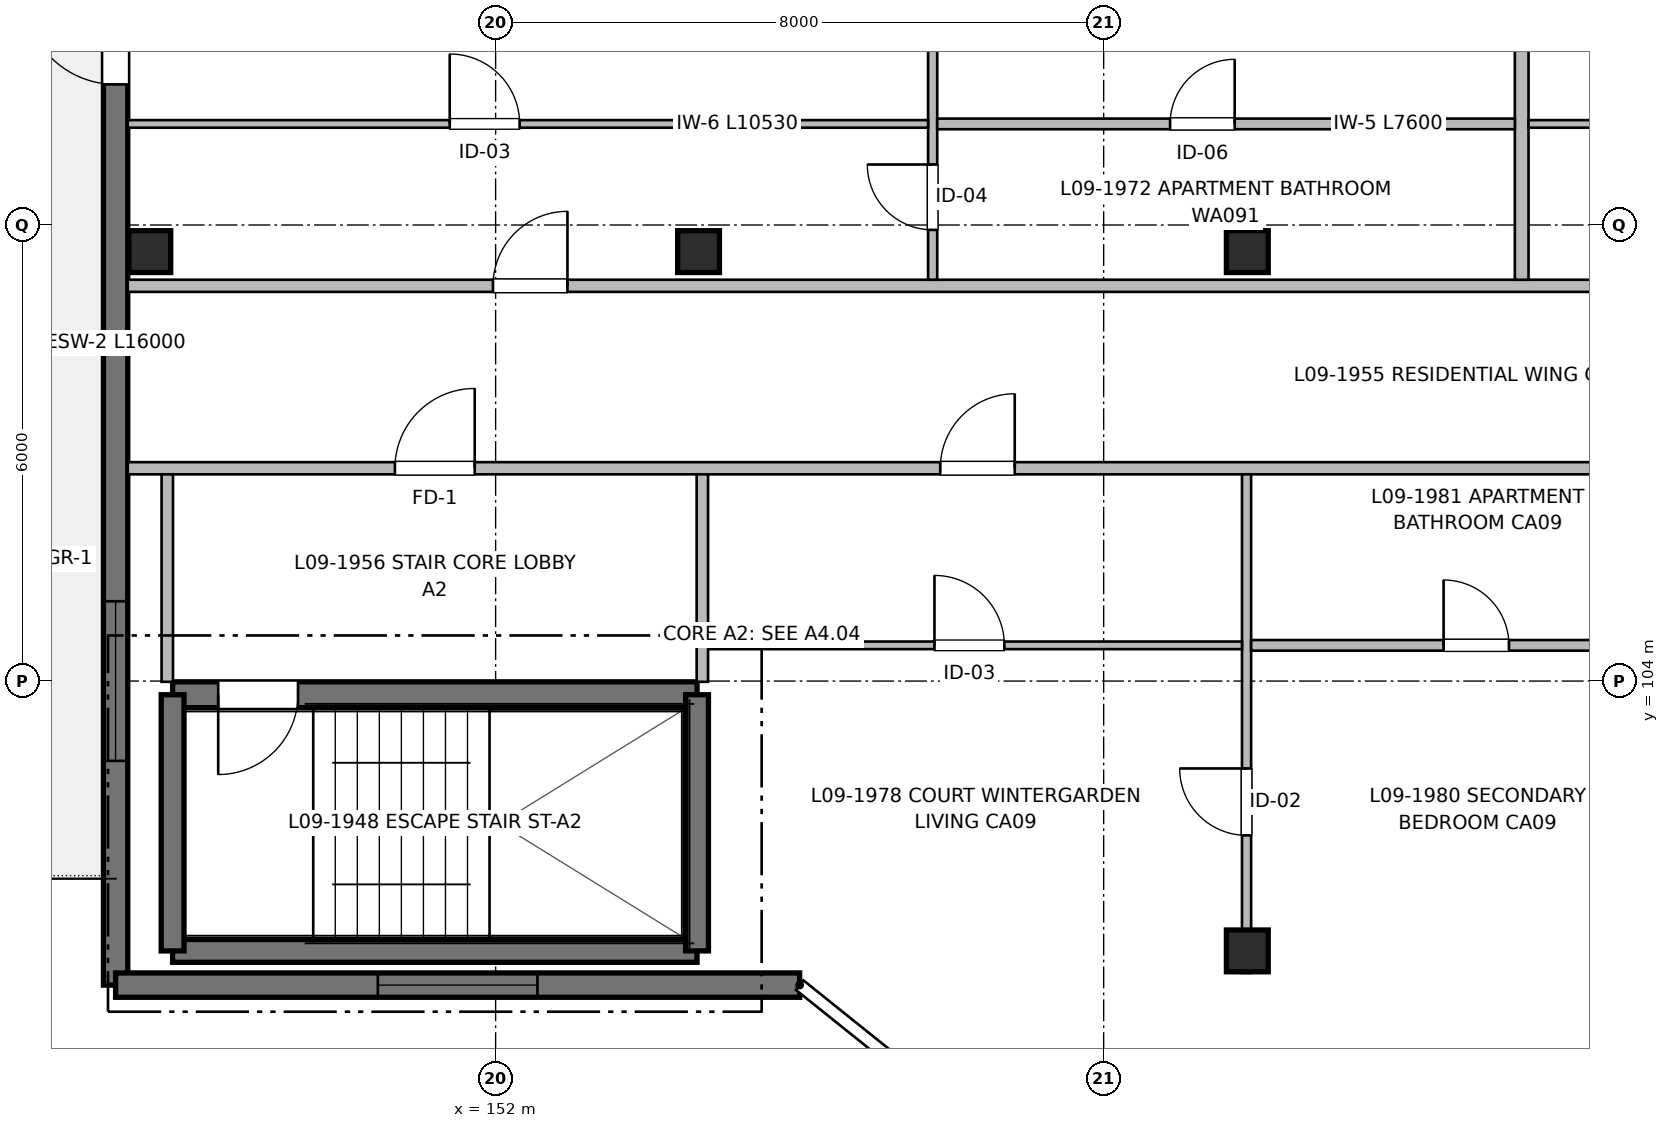
"""IFC4 building model, lengths in metres.
Left out: names, types, materials, properties, quantities, classifications, styles, units other than length and angle.
Written with IfcOpenShell. Run it as: python <this file> out.ifc"""

import sys

from ifc_helpers import new_model, si_unit, direction, frame, frame_2d, origin, origin_2d, place, context, subcontext, project, spatial, rectangle, extrude, element, fill, save


model = new_model("IFC4")
c1 = context("Model", 3, precision=1e-05, world=origin(), true_north=direction((0.0, 1.0)))
c2 = subcontext(c1, "Body", "Model", "MODEL_VIEW")
j1 = project(units=[si_unit("LENGTHUNIT", "METRE"), si_unit("PLANEANGLEUNIT", "RADIAN")], contexts=[c1])
p1 = place(None, origin())
s1 = spatial("IfcSite", under=j1, at=p1, CompositionType="ELEMENT")
p2 = place(p1, origin())
s2 = spatial("IfcBuilding", under=s1, at=p2, CompositionType="ELEMENT")
p3 = place(p2, frame((0.0, 0.0, 29.76)))
s3 = spatial("IfcBuildingStorey", under=s2, at=p3, CompositionType="ELEMENT", Elevation=29.76)
for number, where, z_axis, x_axis in (
    (1, (147.45, 109.65, 0.0), (0.0, 0.0, 1.0), (1.0, 0.0, 0.0)),
    (2, (154.67, 109.65, 0.0), (0.0, 0.0, 1.0), (1.0, 0.0, 0.0)),
    (3, (161.89, 100.45, 0.0), (0.0, 0.0, 1.0), (1.0, 0.0, 0.0)),
    (4, (161.89, 109.65, 0.0), (0.0, 0.0, 1.0), (1.0, 0.0, 0.0)),
):
    element("IfcColumn", number, at=place(p3, frame(where, z_axis=z_axis, x_axis=x_axis)), inside=s3, PredefinedType="COLUMN", context=c2, shape_type="SweptSolid", body=[
        extrude(rectangle(XDim=0.55, YDim=0.55, at=origin_2d()), origin(), (0.0, 0.0, 1.0), 3.2),
    ])
p4 = place(p3, frame((147.75, 100.45, 0.0), z_axis=(0.0, 0.0, 1.0), x_axis=(1.0, 0.0, 0.0)))
e5 = element("IfcWall", 5, at=p4, inside=s3, PredefinedType="SHEAR", context=c2, shape_type="SweptSolid", body=[
    extrude(rectangle(XDim=6.9, YDim=0.3, at=frame_2d((3.45, 0.0))), origin(), (0.0, 0.0, 1.0), 3.2),
])
p5 = place(p3, frame((154.65, 103.82, 0.0), z_axis=(0.0, 0.0, 1.0), x_axis=(-1.0, 0.0, 0.0)))
e6 = element("IfcWall", 6, at=p5, inside=s3, PredefinedType="SHEAR", context=c2, shape_type="SweptSolid", body=[
    extrude(rectangle(XDim=6.9, YDim=0.34, at=frame_2d((3.45, 0.0))), origin(), (0.0, 0.0, 1.0), 3.2),
])
p6 = place(p5, frame((5.25, 0.0, 0.0)))
e7 = element("IfcOpeningElement", 7, at=p6, cuts=e6, PredefinedType="OPENING", context=c2, shape_type="SweptSolid", body=[
    extrude(rectangle(XDim=1.05, YDim=2.15, at=frame_2d((0.525, 1.075))), frame((0.0, 0.18, 0.0), z_axis=(0.0, -1.0, 0.0), x_axis=(1.0, 0.0, 0.0)), (0.0, 0.0, 1.0), 0.36),
])
for number, where, z_axis, x_axis in (
    (8, (147.75, 103.82, 0.0), (0.0, 0.0, 1.0), (0.0, -1.0, 0.0)),
    (9, (154.65, 100.45, 0.0), (0.0, 0.0, 1.0), (0.0, 1.0, 0.0)),
):
    element("IfcWall", number, at=place(p3, frame(where, z_axis=z_axis, x_axis=x_axis)), inside=s3, PredefinedType="SHEAR", context=c2, shape_type="SweptSolid", body=[
        extrude(rectangle(XDim=3.37, YDim=0.3, at=frame_2d((1.685, 0.0))), origin(), (0.0, 0.0, 1.0), 3.2),
    ])
p7 = place(p3, frame((147.0, 100.0, 0.0), z_axis=(0.0, 0.0, 1.0), x_axis=(0.0, 1.0, 0.0)))
e10 = element("IfcWall", 10, at=p7, inside=s3, PredefinedType="SHEAR", context=c2, shape_type="SweptSolid", body=[
    extrude(rectangle(XDim=16.0, YDim=0.32, at=frame_2d((8.0, 0.0))), origin(), (0.0, 0.0, 1.0), 2.98),
])
p8 = place(p7, frame((2.95, 0.0, 0.67)))
e11 = element("IfcOpeningElement", 11, at=p8, cuts=e10, PredefinedType="OPENING", context=c2, shape_type="SweptSolid", body=[
    extrude(rectangle(XDim=2.1, YDim=1.55, at=frame_2d((1.05, 0.775))), frame((0.0, 0.17, 0.0), z_axis=(0.0, -1.0, 0.0), x_axis=(1.0, 0.0, 0.0)), (0.0, 0.0, 1.0), 0.34),
])
p9 = place(p7, frame((11.85, 0.0, 0.0)))
e12 = element("IfcOpeningElement", 12, at=p9, cuts=e10, PredefinedType="OPENING", context=c2, shape_type="SweptSolid", body=[
    extrude(rectangle(XDim=1.2, YDim=2.2, at=frame_2d((0.6, 1.1))), frame((0.0, 0.17, 0.0), z_axis=(0.0, -1.0, 0.0), x_axis=(1.0, 0.0, 0.0)), (0.0, 0.0, 1.0), 0.34),
])
p10 = place(p3, frame((156.0, 100.0, 0.0), z_axis=(0.0, 0.0, 1.0), x_axis=(-1.0, 0.0, 0.0)))
e13 = element("IfcWall", 13, at=p10, inside=s3, PredefinedType="SHEAR", context=c2, shape_type="SweptSolid", body=[
    extrude(rectangle(XDim=9.0, YDim=0.32, at=frame_2d((4.5, 0.0))), origin(), (0.0, 0.0, 1.0), 2.98),
])
p11 = place(p10, frame((3.45, 0.0, 0.67)))
e14 = element("IfcOpeningElement", 14, at=p11, cuts=e13, PredefinedType="OPENING", context=c2, shape_type="SweptSolid", body=[
    extrude(rectangle(XDim=2.1, YDim=1.55, at=frame_2d((1.05, 0.775))), frame((0.0, 0.17, 0.0), z_axis=(0.0, -1.0, 0.0), x_axis=(1.0, 0.0, 0.0)), (0.0, 0.0, 1.0), 0.34),
])
p12 = place(p3, frame((147.16, 106.8, 0.0), z_axis=(0.0, 0.0, 1.0), x_axis=(1.0, 0.0, 0.0)))
e15 = element("IfcWall", 15, at=p12, inside=s3, PredefinedType="PARTITIONING", context=c2, shape_type="SweptSolid", body=[
    extrude(rectangle(XDim=27.64, YDim=0.16, at=frame_2d((13.82, 0.0))), origin(), (0.0, 0.0, 1.0), 2.935),
])
p13 = place(p12, frame((3.515, 0.0, 0.0)))
e16 = element("IfcOpeningElement", 16, at=p13, cuts=e15, PredefinedType="OPENING", context=c2, shape_type="SweptSolid", body=[
    extrude(rectangle(XDim=1.05, YDim=2.15, at=frame_2d((0.525, 1.075))), frame((0.0, 0.09, 0.0), z_axis=(0.0, -1.0, 0.0), x_axis=(1.0, 0.0, 0.0)), (0.0, 0.0, 1.0), 0.18),
])
p14 = place(p12, frame((10.69, 0.0, 0.0)))
e17 = element("IfcOpeningElement", 17, at=p14, cuts=e15, PredefinedType="OPENING", context=c2, shape_type="SweptSolid", body=[
    extrude(rectangle(XDim=0.98, YDim=2.15, at=frame_2d((0.49, 1.075))), frame((0.0, 0.09, 0.0), z_axis=(0.0, -1.0, 0.0), x_axis=(1.0, 0.0, 0.0)), (0.0, 0.0, 1.0), 0.18),
])
p15 = place(p3, frame((147.16, 109.2, 0.0), z_axis=(0.0, 0.0, 1.0), x_axis=(1.0, 0.0, 0.0)))
e18 = element("IfcWall", 18, at=p15, inside=s3, PredefinedType="PARTITIONING", context=c2, shape_type="SweptSolid", body=[
    extrude(rectangle(XDim=36.68, YDim=0.16, at=frame_2d((18.34, 0.0))), origin(), (0.0, 0.0, 1.0), 2.935),
])
p16 = place(p15, frame((4.805, 0.0, 0.0)))
e19 = element("IfcOpeningElement", 19, at=p16, cuts=e18, PredefinedType="OPENING", context=c2, shape_type="SweptSolid", body=[
    extrude(rectangle(XDim=0.98, YDim=2.15, at=frame_2d((0.49, 1.075))), frame((0.0, 0.09, 0.0), z_axis=(0.0, -1.0, 0.0), x_axis=(1.0, 0.0, 0.0)), (0.0, 0.0, 1.0), 0.18),
])
p17 = place(p15, frame((23.235, 0.0, 0.0)))
e20 = element("IfcOpeningElement", 20, at=p17, cuts=e18, PredefinedType="OPENING", context=c2, shape_type="SweptSolid", body=[
    extrude(rectangle(XDim=0.98, YDim=2.15, at=frame_2d((0.49, 1.075))), frame((0.0, 0.09, 0.0), z_axis=(0.0, -1.0, 0.0), x_axis=(1.0, 0.0, 0.0)), (0.0, 0.0, 1.0), 0.18),
])
for number, where, z_axis, x_axis in (
    (21, (147.68, 103.99, 0.0), (0.0, 0.0, 1.0), (0.0, 1.0, 0.0)),
    (22, (154.72, 103.99, 0.0), (0.0, 0.0, 1.0), (0.0, 1.0, 0.0)),
):
    element("IfcWall", number, at=place(p3, frame(where, z_axis=z_axis, x_axis=x_axis)), inside=s3, PredefinedType="PARTITIONING", context=c2, shape_type="SweptSolid", body=[
        extrude(rectangle(XDim=2.73, YDim=0.15, at=frame_2d((1.365, 0.0))), origin(), (0.0, 0.0, 1.0), 2.935),
    ])
p18 = place(p3, frame((165.5, 109.28, 0.0), z_axis=(0.0, 0.0, 1.0), x_axis=(0.0, 1.0, 0.0)))
e23 = element("IfcWall", 23, at=p18, inside=s3, PredefinedType="PARTITIONING", context=c2, shape_type="SweptSolid", body=[
    extrude(rectangle(XDim=6.59, YDim=0.18, at=frame_2d((3.295, 0.0))), origin(), (0.0, 0.0, 1.0), 2.935),
])
p19 = place(p3, frame((157.75, 109.28, 0.0), z_axis=(0.0, 0.0, 1.0), x_axis=(0.0, 1.0, 0.0)))
e24 = element("IfcWall", 24, at=p19, inside=s3, PredefinedType="PARTITIONING", context=c2, shape_type="SweptSolid", body=[
    extrude(rectangle(XDim=6.59, YDim=0.12, at=frame_2d((3.295, 0.0))), origin(), (0.0, 0.0, 1.0), 2.935),
])
p20 = place(p19, frame((0.656, 0.0, 0.0)))
e25 = element("IfcOpeningElement", 25, at=p20, cuts=e24, PredefinedType="OPENING", context=c2, shape_type="SweptSolid", body=[
    extrude(rectangle(XDim=0.86, YDim=2.1, at=frame_2d((0.43, 1.05))), frame((0.0, 0.07, 0.0), z_axis=(0.0, -1.0, 0.0), x_axis=(1.0, 0.0, 0.0)), (0.0, 0.0, 1.0), 0.14),
])
p21 = place(p19, frame((4.093, 0.0, 0.0)))
e26 = element("IfcOpeningElement", 26, at=p21, cuts=e24, PredefinedType="OPENING", context=c2, shape_type="SweptSolid", body=[
    extrude(rectangle(XDim=0.9, YDim=2.1, at=frame_2d((0.45, 1.05))), frame((0.0, 0.07, 0.0), z_axis=(0.0, -1.0, 0.0), x_axis=(1.0, 0.0, 0.0)), (0.0, 0.0, 1.0), 0.14),
])
p22 = place(p3, frame((157.81, 111.33, 0.0), z_axis=(0.0, 0.0, 1.0), x_axis=(1.0, 0.0, 0.0)))
e27 = element("IfcWall", 27, at=p22, inside=s3, PredefinedType="PARTITIONING", context=c2, shape_type="SweptSolid", body=[
    extrude(rectangle(XDim=7.6, YDim=0.14, at=frame_2d((3.8, 0.0))), origin(), (0.0, 0.0, 1.0), 2.935),
])
p23 = place(p22, frame((3.064, 0.0, 0.0)))
e28 = element("IfcOpeningElement", 28, at=p23, cuts=e27, PredefinedType="OPENING", context=c2, shape_type="SweptSolid", body=[
    extrude(rectangle(XDim=0.85, YDim=2.05, at=frame_2d((0.425, 1.025))), frame((0.0, 0.08, 0.0), z_axis=(0.0, -1.0, 0.0), x_axis=(1.0, 0.0, 0.0)), (0.0, 0.0, 1.0), 0.16),
])
p24 = place(p3, frame((147.16, 111.33, 0.0), z_axis=(0.0, 0.0, 1.0), x_axis=(1.0, 0.0, 0.0)))
e29 = element("IfcWall", 29, at=p24, inside=s3, PredefinedType="PARTITIONING", context=c2, shape_type="SweptSolid", body=[
    extrude(rectangle(XDim=10.53, YDim=0.1, at=frame_2d((5.265, 0.0))), origin(), (0.0, 0.0, 1.0), 2.935),
])
p25 = place(p24, frame((4.236, 0.0, 0.0)))
e30 = element("IfcOpeningElement", 30, at=p25, cuts=e29, PredefinedType="OPENING", context=c2, shape_type="SweptSolid", body=[
    extrude(rectangle(XDim=0.92, YDim=2.1, at=frame_2d((0.46, 1.05))), frame((0.0, 0.06, 0.0), z_axis=(0.0, -1.0, 0.0), x_axis=(1.0, 0.0, 0.0)), (0.0, 0.0, 1.0), 0.12),
])
p26 = place(p3, frame((165.59, 111.33, 0.0), z_axis=(0.0, 0.0, 1.0), x_axis=(1.0, 0.0, 0.0)))
e31 = element("IfcWall", 31, at=p26, inside=s3, PredefinedType="PARTITIONING", context=c2, shape_type="SweptSolid", body=[
    extrude(rectangle(XDim=10.53, YDim=0.1, at=frame_2d((5.265, 0.0))), origin(), (0.0, 0.0, 1.0), 2.935),
])
p27 = place(p26, frame((4.236, 0.0, 0.0)))
e32 = element("IfcOpeningElement", 32, at=p27, cuts=e31, PredefinedType="OPENING", context=c2, shape_type="SweptSolid", body=[
    extrude(rectangle(XDim=0.92, YDim=2.1, at=frame_2d((0.46, 1.05))), frame((0.0, 0.06, 0.0), z_axis=(0.0, -1.0, 0.0), x_axis=(1.0, 0.0, 0.0)), (0.0, 0.0, 1.0), 0.12),
])
p28 = place(p3, frame((161.88, 100.16, 0.0), z_axis=(0.0, 0.0, 1.0), x_axis=(0.0, 1.0, 0.0)))
e33 = element("IfcWall", 33, at=p28, inside=s3, PredefinedType="PARTITIONING", context=c2, shape_type="SweptSolid", body=[
    extrude(rectangle(XDim=6.56, YDim=0.12, at=frame_2d((3.28, 0.0))), origin(), (0.0, 0.0, 1.0), 2.68),
])
p29 = place(p28, frame((1.81, 0.0, 0.0)))
e34 = element("IfcOpeningElement", 34, at=p29, cuts=e33, PredefinedType="OPENING", context=c2, shape_type="SweptSolid", body=[
    extrude(rectangle(XDim=0.88, YDim=2.1, at=frame_2d((0.44, 1.05))), frame((0.0, 0.07, 0.0), z_axis=(0.0, -1.0, 0.0), x_axis=(1.0, 0.0, 0.0)), (0.0, 0.0, 1.0), 0.14),
])
p30 = place(p3, frame((161.94, 104.47, 0.0), z_axis=(0.0, 0.0, 1.0), x_axis=(1.0, 0.0, 0.0)))
e35 = element("IfcWall", 35, at=p30, inside=s3, PredefinedType="PARTITIONING", context=c2, shape_type="SweptSolid", body=[
    extrude(rectangle(XDim=5.97, YDim=0.14, at=frame_2d((2.985, 0.0))), origin(), (0.0, 0.0, 1.0), 2.935),
])
p31 = place(p30, frame((2.533, 0.0, 0.0)))
e36 = element("IfcOpeningElement", 36, at=p31, cuts=e35, PredefinedType="OPENING", context=c2, shape_type="SweptSolid", body=[
    extrude(rectangle(XDim=0.86, YDim=2.1, at=frame_2d((0.43, 1.05))), frame((0.0, 0.08, 0.0), z_axis=(0.0, -1.0, 0.0), x_axis=(1.0, 0.0, 0.0)), (0.0, 0.0, 1.0), 0.16),
])
p32 = place(p3, frame((154.8, 104.47, 0.0), z_axis=(0.0, 0.0, 1.0), x_axis=(1.0, 0.0, 0.0)))
e37 = element("IfcWall", 37, at=p32, inside=s3, PredefinedType="PARTITIONING", context=c2, shape_type="SweptSolid", body=[
    extrude(rectangle(XDim=7.02, YDim=0.1, at=frame_2d((3.51, 0.0))), origin(), (0.0, 0.0, 1.0), 2.935),
])
p33 = place(p32, frame((2.974, 0.0, 0.0)))
e38 = element("IfcOpeningElement", 38, at=p33, cuts=e37, PredefinedType="OPENING", context=c2, shape_type="SweptSolid", body=[
    extrude(rectangle(XDim=0.92, YDim=2.1, at=frame_2d((0.46, 1.05))), frame((0.0, 0.06, 0.0), z_axis=(0.0, -1.0, 0.0), x_axis=(1.0, 0.0, 0.0)), (0.0, 0.0, 1.0), 0.12),
])
p34 = place(p6, origin())
e39 = element("IfcDoor", 39, at=p34, inside=s3, OperationType="SINGLE_SWING_RIGHT", PredefinedType="DOOR", context=c2, shape_type="SweptSolid", body=[
    extrude(rectangle(XDim=1.05, YDim=2.15, at=frame_2d((0.525, 1.075))), frame((0.0, 0.025, 0.0), z_axis=(0.0, -1.0, 0.0), x_axis=(1.0, 0.0, 0.0)), (0.0, 0.0, 1.0), 0.05),
])
fill(e7, e39)
p35 = place(p8, origin())
e40 = element("IfcWindow", 40, at=p35, inside=s3, PartitioningType="SINGLE_PANEL", PredefinedType="WINDOW", context=c2, shape_type="SweptSolid", body=[
    extrude(rectangle(XDim=2.1, YDim=1.55, at=frame_2d((1.05, 0.775))), frame((0.0, 0.03, 0.0), z_axis=(0.0, -1.0, 0.0), x_axis=(1.0, 0.0, 0.0)), (0.0, 0.0, 1.0), 0.06),
])
fill(e11, e40)
p36 = place(p9, origin())
e41 = element("IfcDoor", 41, at=p36, inside=s3, OperationType="SINGLE_SWING_RIGHT", PredefinedType="DOOR", context=c2, shape_type="SweptSolid", body=[
    extrude(rectangle(XDim=1.2, YDim=2.2, at=frame_2d((0.6, 1.1))), frame((0.0, 0.025, 0.0), z_axis=(0.0, -1.0, 0.0), x_axis=(1.0, 0.0, 0.0)), (0.0, 0.0, 1.0), 0.05),
])
fill(e12, e41)
p37 = place(p11, origin())
e42 = element("IfcWindow", 42, at=p37, inside=s3, PartitioningType="SINGLE_PANEL", PredefinedType="WINDOW", context=c2, shape_type="SweptSolid", body=[
    extrude(rectangle(XDim=2.1, YDim=1.55, at=frame_2d((1.05, 0.775))), frame((0.0, 0.03, 0.0), z_axis=(0.0, -1.0, 0.0), x_axis=(1.0, 0.0, 0.0)), (0.0, 0.0, 1.0), 0.06),
])
fill(e14, e42)
p38 = place(p13, origin())
e43 = element("IfcDoor", 43, at=p38, inside=s3, OperationType="SINGLE_SWING_RIGHT", PredefinedType="DOOR", context=c2, shape_type="SweptSolid", body=[
    extrude(rectangle(XDim=1.05, YDim=2.15, at=frame_2d((0.525, 1.075))), frame((0.0, 0.025, 0.0), z_axis=(0.0, -1.0, 0.0), x_axis=(1.0, 0.0, 0.0)), (0.0, 0.0, 1.0), 0.05),
])
fill(e16, e43)
p39 = place(p16, origin())
e44 = element("IfcDoor", 44, at=p39, inside=s3, OperationType="SINGLE_SWING_RIGHT", PredefinedType="DOOR", context=c2, shape_type="SweptSolid", body=[
    extrude(rectangle(XDim=0.98, YDim=2.15, at=frame_2d((0.49, 1.075))), frame((0.0, 0.025, 0.0), z_axis=(0.0, -1.0, 0.0), x_axis=(1.0, 0.0, 0.0)), (0.0, 0.0, 1.0), 0.05),
])
fill(e19, e44)
p40 = place(p25, origin())
e45 = element("IfcDoor", 45, at=p40, inside=s3, OperationType="SINGLE_SWING_LEFT", PredefinedType="DOOR", context=c2, shape_type="SweptSolid", body=[
    extrude(rectangle(XDim=0.92, YDim=2.1, at=frame_2d((0.46, 1.05))), frame((0.0, 0.025, 0.0), z_axis=(0.0, -1.0, 0.0), x_axis=(1.0, 0.0, 0.0)), (0.0, 0.0, 1.0), 0.05),
])
fill(e30, e45)
p41 = place(p20, origin())
e46 = element("IfcDoor", 46, at=p41, inside=s3, OperationType="SINGLE_SWING_RIGHT", PredefinedType="DOOR", context=c2, shape_type="SweptSolid", body=[
    extrude(rectangle(XDim=0.86, YDim=2.1, at=frame_2d((0.43, 1.05))), frame((0.0, 0.025, 0.0), z_axis=(0.0, -1.0, 0.0), x_axis=(1.0, 0.0, 0.0)), (0.0, 0.0, 1.0), 0.05),
])
fill(e25, e46)
p42 = place(p23, origin())
e47 = element("IfcDoor", 47, at=p42, inside=s3, OperationType="SINGLE_SWING_RIGHT", PredefinedType="DOOR", context=c2, shape_type="SweptSolid", body=[
    extrude(rectangle(XDim=0.85, YDim=2.05, at=frame_2d((0.425, 1.025))), frame((0.0, 0.025, 0.0), z_axis=(0.0, -1.0, 0.0), x_axis=(1.0, 0.0, 0.0)), (0.0, 0.0, 1.0), 0.05),
])
fill(e28, e47)
p43 = place(p14, origin())
e48 = element("IfcDoor", 48, at=p43, inside=s3, OperationType="SINGLE_SWING_RIGHT", PredefinedType="DOOR", context=c2, shape_type="SweptSolid", body=[
    extrude(rectangle(XDim=0.98, YDim=2.15, at=frame_2d((0.49, 1.075))), frame((0.0, 0.025, 0.0), z_axis=(0.0, -1.0, 0.0), x_axis=(1.0, 0.0, 0.0)), (0.0, 0.0, 1.0), 0.05),
])
fill(e17, e48)
p44 = place(p33, origin())
e49 = element("IfcDoor", 49, at=p44, inside=s3, OperationType="SINGLE_SWING_LEFT", PredefinedType="DOOR", context=c2, shape_type="SweptSolid", body=[
    extrude(rectangle(XDim=0.92, YDim=2.1, at=frame_2d((0.46, 1.05))), frame((0.0, 0.025, 0.0), z_axis=(0.0, -1.0, 0.0), x_axis=(1.0, 0.0, 0.0)), (0.0, 0.0, 1.0), 0.05),
])
fill(e38, e49)
p45 = place(p29, origin())
e50 = element("IfcDoor", 50, at=p45, inside=s3, OperationType="SINGLE_SWING_RIGHT", PredefinedType="DOOR", context=c2, shape_type="SweptSolid", body=[
    extrude(rectangle(XDim=0.88, YDim=2.1, at=frame_2d((0.44, 1.05))), frame((0.0, 0.025, 0.0), z_axis=(0.0, -1.0, 0.0), x_axis=(1.0, 0.0, 0.0)), (0.0, 0.0, 1.0), 0.05),
])
fill(e34, e50)
p46 = place(p31, origin())
e51 = element("IfcDoor", 51, at=p46, inside=s3, OperationType="SINGLE_SWING_LEFT", PredefinedType="DOOR", context=c2, shape_type="SweptSolid", body=[
    extrude(rectangle(XDim=0.86, YDim=2.1, at=frame_2d((0.43, 1.05))), frame((0.0, 0.025, 0.0), z_axis=(0.0, -1.0, 0.0), x_axis=(1.0, 0.0, 0.0)), (0.0, 0.0, 1.0), 0.05),
])
fill(e36, e51)
save(model, sys.argv[1])
